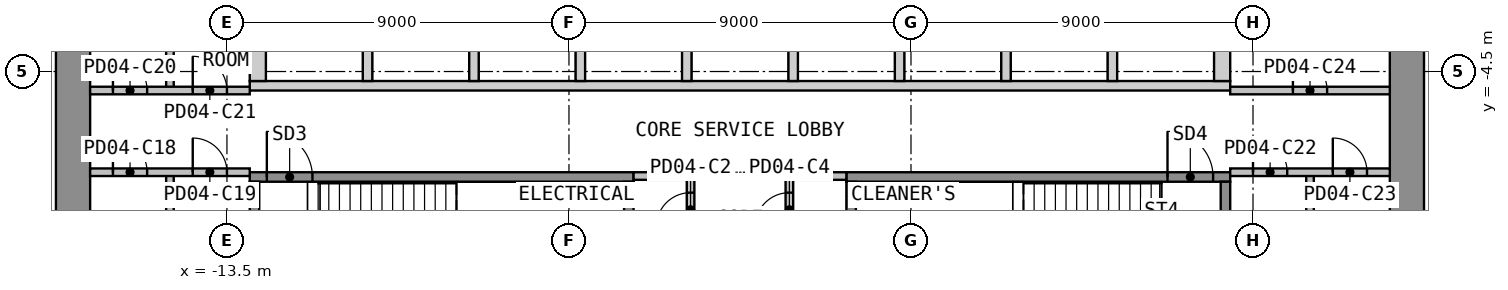
"""IFC4 building model, lengths in metres.
Left out: names, types, materials, properties, quantities, classifications, styles, units other than length and angle.
Written with IfcOpenShell. Run it as: python <this file> out.ifc"""

import sys

from ifc_helpers import new_model, si_unit, direction, frame, frame_2d, origin, place, context, subcontext, project, spatial, polyline, rectangle, outline, extrude, element, fill, save


model = new_model("IFC4")
c1 = context("Model", 3, precision=1e-05, world=origin(), true_north=direction((0.0, 1.0)))
c2 = subcontext(c1, "Body", "Model", "MODEL_VIEW")
j1 = project(units=[si_unit("LENGTHUNIT", "METRE"), si_unit("PLANEANGLEUNIT", "RADIAN")], contexts=[c1])
p1 = place(None, origin())
s1 = spatial("IfcSite", under=j1, at=p1, CompositionType="ELEMENT")
p2 = place(p1, origin())
s2 = spatial("IfcBuilding", under=s1, at=p2, CompositionType="ELEMENT")
p3 = place(p2, frame((0.0, 0.0, 20.4)))
s3 = spatial("IfcBuildingStorey", under=s2, at=p3, CompositionType="ELEMENT", Elevation=20.4)
p4 = place(p3, frame((-17.55, -12.6, 0.0), z_axis=(0.0, 0.0, 1.0), x_axis=(0.0, 1.0, 0.0)))
e1 = element("IfcWall", 1, at=p4, inside=s3, PredefinedType="SHEAR", context=c2, shape_type="SweptSolid", body=[
    extrude(rectangle(XDim=25.2, YDim=0.9, at=frame_2d((12.6, 0.0))), origin(), (0.0, 0.0, 1.0), 4.4),
])
p5 = place(p4, frame((11.4, 0.0, 0.0)))
e2 = element("IfcOpeningElement", 2, at=p5, cuts=e1, PredefinedType="OPENING", context=c2, shape_type="SweptSolid", body=[
    extrude(rectangle(XDim=2.4, YDim=2.1, at=frame_2d((1.2, 1.05))), frame((0.0, 0.46, 0.0), z_axis=(0.0, -1.0, 0.0), x_axis=(1.0, 0.0, 0.0)), (0.0, 0.0, 1.0), 0.92),
])
p6 = place(p3, frame((17.55, -12.6, 0.0), z_axis=(0.0, 0.0, 1.0), x_axis=(0.0, 1.0, 0.0)))
e3 = element("IfcWall", 3, at=p6, inside=s3, PredefinedType="SHEAR", context=c2, shape_type="SweptSolid", body=[
    extrude(rectangle(XDim=25.2, YDim=0.9, at=frame_2d((12.6, 0.0))), origin(), (0.0, 0.0, 1.0), 4.4),
])
p7 = place(p6, frame((11.4, 0.0, 0.0)))
e4 = element("IfcOpeningElement", 4, at=p7, cuts=e3, PredefinedType="OPENING", context=c2, shape_type="SweptSolid", body=[
    extrude(rectangle(XDim=2.4, YDim=2.1, at=frame_2d((1.2, 1.05))), frame((0.0, 0.46, 0.0), z_axis=(0.0, -1.0, 0.0), x_axis=(1.0, 0.0, 0.0)), (0.0, 0.0, 1.0), 0.92),
])
p8 = place(p3, origin())
e5 = element("IfcWall", 5, at=p8, inside=s3, PredefinedType="SHEAR", context=c2, shape_type="SweptSolid", body=[
    extrude(outline(polyline([(-12.9, -5.0), (12.9, -5.0), (12.9, -4.75), (-12.9, -4.75), (-12.9, -5.0)])), origin(), (0.0, 0.0, 1.0), 4.4),
])
p9 = place(p3, origin())
e6 = element("IfcWall", 6, at=p9, inside=s3, PredefinedType="SHEAR", context=c2, shape_type="SweptSolid", body=[
    extrude(outline(polyline([(-12.9, -4.75), (-12.475, -4.75), (-12.475, -2.05), (-12.9, -2.05), (-12.9, -4.75)])), origin(), (0.0, 0.0, 1.0), 4.4),
])
p10 = place(p3, origin())
e7 = element("IfcWall", 7, at=p10, inside=s3, PredefinedType="SHEAR", context=c2, shape_type="SweptSolid", body=[
    extrude(outline(polyline([(-9.925, -4.75), (-9.675, -4.75), (-9.675, -2.05), (-9.925, -2.05), (-9.925, -4.75)])), origin(), (0.0, 0.0, 1.0), 4.4),
])
p11 = place(p3, origin())
e8 = element("IfcWall", 8, at=p11, inside=s3, PredefinedType="SHEAR", context=c2, shape_type="SweptSolid", body=[
    extrude(outline(polyline([(-7.125, -4.75), (-6.875, -4.75), (-6.875, -2.05), (-7.125, -2.05), (-7.125, -4.75)])), origin(), (0.0, 0.0, 1.0), 4.4),
])
p12 = place(p3, origin())
e9 = element("IfcWall", 9, at=p12, inside=s3, PredefinedType="SHEAR", context=c2, shape_type="SweptSolid", body=[
    extrude(outline(polyline([(-4.325, -4.75), (-4.075, -4.75), (-4.075, -2.05), (-4.325, -2.05), (-4.325, -4.75)])), origin(), (0.0, 0.0, 1.0), 4.4),
])
p13 = place(p3, origin())
e10 = element("IfcWall", 10, at=p13, inside=s3, PredefinedType="SHEAR", context=c2, shape_type="SweptSolid", body=[
    extrude(outline(polyline([(-1.525, -4.75), (-1.275, -4.75), (-1.275, -2.05), (-1.525, -2.05), (-1.525, -4.75)])), origin(), (0.0, 0.0, 1.0), 4.4),
])
p14 = place(p3, origin())
e11 = element("IfcWall", 11, at=p14, inside=s3, PredefinedType="SHEAR", context=c2, shape_type="SweptSolid", body=[
    extrude(outline(polyline([(1.275, -4.75), (1.525, -4.75), (1.525, -2.05), (1.275, -2.05), (1.275, -4.75)])), origin(), (0.0, 0.0, 1.0), 4.4),
])
p15 = place(p3, origin())
e12 = element("IfcWall", 12, at=p15, inside=s3, PredefinedType="SHEAR", context=c2, shape_type="SweptSolid", body=[
    extrude(outline(polyline([(4.075, -4.75), (4.325, -4.75), (4.325, -2.05), (4.075, -2.05), (4.075, -4.75)])), origin(), (0.0, 0.0, 1.0), 4.4),
])
p16 = place(p3, origin())
e13 = element("IfcWall", 13, at=p16, inside=s3, PredefinedType="SHEAR", context=c2, shape_type="SweptSolid", body=[
    extrude(outline(polyline([(6.875, -4.75), (7.125, -4.75), (7.125, -2.05), (6.875, -2.05), (6.875, -4.75)])), origin(), (0.0, 0.0, 1.0), 4.4),
])
p17 = place(p3, origin())
e14 = element("IfcWall", 14, at=p17, inside=s3, PredefinedType="SHEAR", context=c2, shape_type="SweptSolid", body=[
    extrude(outline(polyline([(9.675, -4.75), (9.925, -4.75), (9.925, -2.05), (9.675, -2.05), (9.675, -4.75)])), origin(), (0.0, 0.0, 1.0), 4.4),
])
p18 = place(p3, origin())
e15 = element("IfcWall", 15, at=p18, inside=s3, PredefinedType="SHEAR", context=c2, shape_type="SweptSolid", body=[
    extrude(outline(polyline([(12.475, -4.75), (12.9, -4.75), (12.9, -2.05), (12.475, -2.05), (12.475, -4.75)])), origin(), (0.0, 0.0, 1.0), 4.4),
])
p19 = place(p3, frame((-12.9, -7.275, 0.0), z_axis=(0.0, 0.0, 1.0), x_axis=(1.0, 0.0, 0.0)))
e16 = element("IfcWall", 16, at=p19, inside=s3, PredefinedType="SHEAR", context=c2, shape_type="SweptSolid", body=[
    extrude(rectangle(XDim=10.1, YDim=0.25, at=frame_2d((5.05, 0.0))), origin(), (0.0, 0.0, 1.0), 4.4),
])
p20 = place(p19, frame((0.45, 0.0, 0.0)))
e17 = element("IfcOpeningElement", 17, at=p20, cuts=e16, PredefinedType="OPENING", context=c2, shape_type="SweptSolid", body=[
    extrude(rectangle(XDim=1.2, YDim=2.1, at=frame_2d((0.6, 1.05))), frame((0.0, 0.135, 0.0), z_axis=(0.0, -1.0, 0.0), x_axis=(1.0, 0.0, 0.0)), (0.0, 0.0, 1.0), 0.27),
])
for number, where, z_axis, x_axis in (
    (18, (-12.775, -10.65, 0.0), (0.0, 0.0, 1.0), (0.0, 1.0, 0.0)),
    (19, (-2.925, -10.65, 0.0), (0.0, 0.0, 1.0), (0.0, 1.0, 0.0)),
):
    element("IfcWall", number, at=place(p3, frame(where, z_axis=z_axis, x_axis=x_axis)), inside=s3, PredefinedType="SHEAR", context=c2, shape_type="SweptSolid", body=[
        extrude(rectangle(XDim=3.25, YDim=0.25, at=frame_2d((1.625, 0.0))), origin(), (0.0, 0.0, 1.0), 4.4),
    ])
p21 = place(p3, frame((2.8, -7.275, 0.0), z_axis=(0.0, 0.0, 1.0), x_axis=(1.0, 0.0, 0.0)))
e20 = element("IfcWall", 20, at=p21, inside=s3, PredefinedType="SHEAR", context=c2, shape_type="SweptSolid", body=[
    extrude(rectangle(XDim=10.1, YDim=0.25, at=frame_2d((5.05, 0.0))), origin(), (0.0, 0.0, 1.0), 4.4),
])
p22 = place(p21, frame((8.45, 0.0, 0.0)))
e21 = element("IfcOpeningElement", 21, at=p22, cuts=e20, PredefinedType="OPENING", context=c2, shape_type="SweptSolid", body=[
    extrude(rectangle(XDim=1.2, YDim=2.1, at=frame_2d((0.6, 1.05))), frame((0.0, 0.135, 0.0), z_axis=(0.0, -1.0, 0.0), x_axis=(1.0, 0.0, 0.0)), (0.0, 0.0, 1.0), 0.27),
])
for number, where, z_axis, x_axis in (
    (22, (2.925, -10.65, 0.0), (0.0, 0.0, 1.0), (0.0, 1.0, 0.0)),
    (23, (12.775, -10.65, 0.0), (0.0, 0.0, 1.0), (0.0, 1.0, 0.0)),
):
    element("IfcWall", number, at=place(p3, frame(where, z_axis=z_axis, x_axis=x_axis)), inside=s3, PredefinedType="SHEAR", context=c2, shape_type="SweptSolid", body=[
        extrude(rectangle(XDim=3.25, YDim=0.25, at=frame_2d((1.625, 0.0))), origin(), (0.0, 0.0, 1.0), 4.4),
    ])
for number, where, z_axis, x_axis in (
    (24, (-2.8, -7.25, 0.0), (0.0, 0.0, 1.0), (1.0, 0.0, 0.0)),
    (25, (1.4, -7.25, 0.0), (0.0, 0.0, 1.0), (1.0, 0.0, 0.0)),
):
    element("IfcWall", number, at=place(p3, frame(where, z_axis=z_axis, x_axis=x_axis)), inside=s3, PredefinedType="PARTITIONING", context=c2, shape_type="SweptSolid", body=[
        extrude(rectangle(XDim=1.4, YDim=0.2, at=frame_2d((0.7, 0.0))), origin(), (0.0, 0.0, 1.0), 4.4),
    ])
p23 = place(p3, frame((-1.3, -12.6, 0.0), z_axis=(0.0, 0.0, 1.0), x_axis=(0.0, 1.0, 0.0)))
e26 = element("IfcWall", 26, at=p23, inside=s3, PredefinedType="PARTITIONING", context=c2, shape_type="SweptSolid", body=[
    extrude(rectangle(XDim=5.45, YDim=0.2, at=frame_2d((2.725, 0.0))), origin(), (0.0, 0.0, 1.0), 4.4),
])
p24 = place(p23, frame((1.387, 0.0, 0.0)))
e27 = element("IfcOpeningElement", 27, at=p24, cuts=e26, PredefinedType="OPENING", context=c2, shape_type="SweptSolid", body=[
    extrude(rectangle(XDim=0.9, YDim=2.1, at=frame_2d((0.45, 1.05))), frame((0.0, 0.11, 0.0), z_axis=(0.0, -1.0, 0.0), x_axis=(1.0, 0.0, 0.0)), (0.0, 0.0, 1.0), 0.22),
])
p25 = place(p23, frame((4.012, 0.0, 0.0)))
e28 = element("IfcOpeningElement", 28, at=p25, cuts=e26, PredefinedType="OPENING", context=c2, shape_type="SweptSolid", body=[
    extrude(rectangle(XDim=0.9, YDim=2.1, at=frame_2d((0.45, 1.05))), frame((0.0, 0.11, 0.0), z_axis=(0.0, -1.0, 0.0), x_axis=(1.0, 0.0, 0.0)), (0.0, 0.0, 1.0), 0.22),
])
p26 = place(p3, frame((1.3, -12.6, 0.0), z_axis=(0.0, 0.0, 1.0), x_axis=(0.0, 1.0, 0.0)))
e29 = element("IfcWall", 29, at=p26, inside=s3, PredefinedType="PARTITIONING", context=c2, shape_type="SweptSolid", body=[
    extrude(rectangle(XDim=5.45, YDim=0.2, at=frame_2d((2.725, 0.0))), origin(), (0.0, 0.0, 1.0), 4.4),
])
p27 = place(p26, frame((1.387, 0.0, 0.0)))
e30 = element("IfcOpeningElement", 30, at=p27, cuts=e29, PredefinedType="OPENING", context=c2, shape_type="SweptSolid", body=[
    extrude(rectangle(XDim=0.9, YDim=2.1, at=frame_2d((0.45, 1.05))), frame((0.0, 0.11, 0.0), z_axis=(0.0, -1.0, 0.0), x_axis=(1.0, 0.0, 0.0)), (0.0, 0.0, 1.0), 0.22),
])
p28 = place(p26, frame((4.012, 0.0, 0.0)))
e31 = element("IfcOpeningElement", 31, at=p28, cuts=e29, PredefinedType="OPENING", context=c2, shape_type="SweptSolid", body=[
    extrude(rectangle(XDim=0.9, YDim=2.1, at=frame_2d((0.45, 1.05))), frame((0.0, 0.11, 0.0), z_axis=(0.0, -1.0, 0.0), x_axis=(1.0, 0.0, 0.0)), (0.0, 0.0, 1.0), 0.22),
])
p29 = place(p3, frame((-15.0, -12.6, 0.0), z_axis=(0.0, 0.0, 1.0), x_axis=(0.0, 1.0, 0.0)))
e32 = element("IfcWall", 32, at=p29, inside=s3, PredefinedType="PARTITIONING", context=c2, shape_type="SweptSolid", body=[
    extrude(rectangle(XDim=5.45, YDim=0.2, at=frame_2d((2.725, 0.0))), origin(), (0.0, 0.0, 1.0), 4.4),
])
p30 = place(p3, frame((-17.1, -7.15, 0.0), z_axis=(0.0, 0.0, 1.0), x_axis=(1.0, 0.0, 0.0)))
e33 = element("IfcWall", 33, at=p30, inside=s3, PredefinedType="PARTITIONING", context=c2, shape_type="SweptSolid", body=[
    extrude(rectangle(XDim=4.2, YDim=0.2, at=frame_2d((2.1, 0.0))), origin(), (0.0, 0.0, 1.0), 4.4),
])
p31 = place(p30, frame((0.6, 0.0, 0.0)))
e34 = element("IfcOpeningElement", 34, at=p31, cuts=e33, PredefinedType="OPENING", context=c2, shape_type="SweptSolid", body=[
    extrude(rectangle(XDim=0.9, YDim=2.1, at=frame_2d((0.45, 1.05))), frame((0.0, 0.11, 0.0), z_axis=(0.0, -1.0, 0.0), x_axis=(1.0, 0.0, 0.0)), (0.0, 0.0, 1.0), 0.22),
])
p32 = place(p30, frame((2.7, 0.0, 0.0)))
e35 = element("IfcOpeningElement", 35, at=p32, cuts=e33, PredefinedType="OPENING", context=c2, shape_type="SweptSolid", body=[
    extrude(rectangle(XDim=0.9, YDim=2.1, at=frame_2d((0.45, 1.05))), frame((0.0, 0.11, 0.0), z_axis=(0.0, -1.0, 0.0), x_axis=(1.0, 0.0, 0.0)), (0.0, 0.0, 1.0), 0.22),
])
p33 = place(p3, frame((-15.0, -5.0, 0.0), z_axis=(0.0, 0.0, 1.0), x_axis=(0.0, 1.0, 0.0)))
e36 = element("IfcWall", 36, at=p33, inside=s3, PredefinedType="PARTITIONING", context=c2, shape_type="SweptSolid", body=[
    extrude(rectangle(XDim=3.2, YDim=0.2, at=frame_2d((1.6, 0.0))), origin(), (0.0, 0.0, 1.0), 4.4),
])
p34 = place(p3, frame((-17.1, -5.0, 0.0), z_axis=(0.0, 0.0, 1.0), x_axis=(1.0, 0.0, 0.0)))
e37 = element("IfcWall", 37, at=p34, inside=s3, PredefinedType="PARTITIONING", context=c2, shape_type="SweptSolid", body=[
    extrude(rectangle(XDim=4.2, YDim=0.2, at=frame_2d((2.1, 0.0))), origin(), (0.0, 0.0, 1.0), 4.4),
])
p35 = place(p34, frame((0.6, 0.0, 0.0)))
e38 = element("IfcOpeningElement", 38, at=p35, cuts=e37, PredefinedType="OPENING", context=c2, shape_type="SweptSolid", body=[
    extrude(rectangle(XDim=0.9, YDim=2.1, at=frame_2d((0.45, 1.05))), frame((0.0, 0.11, 0.0), z_axis=(0.0, -1.0, 0.0), x_axis=(1.0, 0.0, 0.0)), (0.0, 0.0, 1.0), 0.22),
])
p36 = place(p34, frame((2.7, 0.0, 0.0)))
e39 = element("IfcOpeningElement", 39, at=p36, cuts=e37, PredefinedType="OPENING", context=c2, shape_type="SweptSolid", body=[
    extrude(rectangle(XDim=0.9, YDim=2.1, at=frame_2d((0.45, 1.05))), frame((0.0, 0.11, 0.0), z_axis=(0.0, -1.0, 0.0), x_axis=(1.0, 0.0, 0.0)), (0.0, 0.0, 1.0), 0.22),
])
p37 = place(p3, frame((15.0, -12.6, 0.0), z_axis=(0.0, 0.0, 1.0), x_axis=(0.0, 1.0, 0.0)))
e40 = element("IfcWall", 40, at=p37, inside=s3, PredefinedType="PARTITIONING", context=c2, shape_type="SweptSolid", body=[
    extrude(rectangle(XDim=5.45, YDim=0.2, at=frame_2d((2.725, 0.0))), origin(), (0.0, 0.0, 1.0), 4.4),
])
p38 = place(p3, frame((12.9, -7.15, 0.0), z_axis=(0.0, 0.0, 1.0), x_axis=(1.0, 0.0, 0.0)))
e41 = element("IfcWall", 41, at=p38, inside=s3, PredefinedType="PARTITIONING", context=c2, shape_type="SweptSolid", body=[
    extrude(rectangle(XDim=4.2, YDim=0.2, at=frame_2d((2.1, 0.0))), origin(), (0.0, 0.0, 1.0), 4.4),
])
p39 = place(p38, frame((0.6, 0.0, 0.0)))
e42 = element("IfcOpeningElement", 42, at=p39, cuts=e41, PredefinedType="OPENING", context=c2, shape_type="SweptSolid", body=[
    extrude(rectangle(XDim=0.9, YDim=2.1, at=frame_2d((0.45, 1.05))), frame((0.0, 0.11, 0.0), z_axis=(0.0, -1.0, 0.0), x_axis=(1.0, 0.0, 0.0)), (0.0, 0.0, 1.0), 0.22),
])
p40 = place(p38, frame((2.7, 0.0, 0.0)))
e43 = element("IfcOpeningElement", 43, at=p40, cuts=e41, PredefinedType="OPENING", context=c2, shape_type="SweptSolid", body=[
    extrude(rectangle(XDim=0.9, YDim=2.1, at=frame_2d((0.45, 1.05))), frame((0.0, 0.11, 0.0), z_axis=(0.0, -1.0, 0.0), x_axis=(1.0, 0.0, 0.0)), (0.0, 0.0, 1.0), 0.22),
])
p41 = place(p3, frame((12.9, -5.0, 0.0), z_axis=(0.0, 0.0, 1.0), x_axis=(1.0, 0.0, 0.0)))
e44 = element("IfcWall", 44, at=p41, inside=s3, PredefinedType="PARTITIONING", context=c2, shape_type="SweptSolid", body=[
    extrude(rectangle(XDim=4.2, YDim=0.2, at=frame_2d((2.1, 0.0))), origin(), (0.0, 0.0, 1.0), 4.4),
])
p42 = place(p41, frame((1.65, 0.0, 0.0)))
e45 = element("IfcOpeningElement", 45, at=p42, cuts=e44, PredefinedType="OPENING", context=c2, shape_type="SweptSolid", body=[
    extrude(rectangle(XDim=0.9, YDim=2.1, at=frame_2d((0.45, 1.05))), frame((0.0, 0.11, 0.0), z_axis=(0.0, -1.0, 0.0), x_axis=(1.0, 0.0, 0.0)), (0.0, 0.0, 1.0), 0.22),
])
p43 = place(p20, origin())
e46 = element("IfcDoor", 46, at=p43, inside=s3, OperationType="SINGLE_SWING_LEFT", PredefinedType="DOOR", context=c2, shape_type="SweptSolid", body=[
    extrude(rectangle(XDim=1.2, YDim=2.1, at=frame_2d((0.6, 1.05))), frame((0.0, 0.025, 0.0), z_axis=(0.0, -1.0, 0.0), x_axis=(1.0, 0.0, 0.0)), (0.0, 0.0, 1.0), 0.05),
])
fill(e17, e46)
p44 = place(p22, origin())
e47 = element("IfcDoor", 47, at=p44, inside=s3, OperationType="SINGLE_SWING_LEFT", PredefinedType="DOOR", context=c2, shape_type="SweptSolid", body=[
    extrude(rectangle(XDim=1.2, YDim=2.1, at=frame_2d((0.6, 1.05))), frame((0.0, 0.025, 0.0), z_axis=(0.0, -1.0, 0.0), x_axis=(1.0, 0.0, 0.0)), (0.0, 0.0, 1.0), 0.05),
])
fill(e21, e47)
p45 = place(p25, origin())
e48 = element("IfcDoor", 48, at=p45, inside=s3, OperationType="SINGLE_SWING_LEFT", PredefinedType="DOOR", context=c2, shape_type="SweptSolid", body=[
    extrude(rectangle(XDim=0.9, YDim=2.1, at=frame_2d((0.45, 1.05))), frame((0.0, 0.025, 0.0), z_axis=(0.0, -1.0, 0.0), x_axis=(1.0, 0.0, 0.0)), (0.0, 0.0, 1.0), 0.05),
])
fill(e28, e48)
p46 = place(p28, origin())
e49 = element("IfcDoor", 49, at=p46, inside=s3, OperationType="SINGLE_SWING_LEFT", PredefinedType="DOOR", context=c2, shape_type="SweptSolid", body=[
    extrude(rectangle(XDim=0.9, YDim=2.1, at=frame_2d((0.45, 1.05))), frame((0.0, 0.025, 0.0), z_axis=(0.0, -1.0, 0.0), x_axis=(1.0, 0.0, 0.0)), (0.0, 0.0, 1.0), 0.05),
])
fill(e31, e49)
p47 = place(p31, origin())
e50 = element("IfcDoor", 50, at=p47, inside=s3, OperationType="SINGLE_SWING_LEFT", PredefinedType="DOOR", context=c2, shape_type="SweptSolid", body=[
    extrude(rectangle(XDim=0.9, YDim=2.1, at=frame_2d((0.45, 1.05))), frame((0.0, 0.025, 0.0), z_axis=(0.0, -1.0, 0.0), x_axis=(1.0, 0.0, 0.0)), (0.0, 0.0, 1.0), 0.05),
])
fill(e34, e50)
p48 = place(p32, origin())
e51 = element("IfcDoor", 51, at=p48, inside=s3, OperationType="SINGLE_SWING_LEFT", PredefinedType="DOOR", context=c2, shape_type="SweptSolid", body=[
    extrude(rectangle(XDim=0.9, YDim=2.1, at=frame_2d((0.45, 1.05))), frame((0.0, 0.025, 0.0), z_axis=(0.0, -1.0, 0.0), x_axis=(1.0, 0.0, 0.0)), (0.0, 0.0, 1.0), 0.05),
])
fill(e35, e51)
p49 = place(p35, origin())
e52 = element("IfcDoor", 52, at=p49, inside=s3, OperationType="SINGLE_SWING_LEFT", PredefinedType="DOOR", context=c2, shape_type="SweptSolid", body=[
    extrude(rectangle(XDim=0.9, YDim=2.1, at=frame_2d((0.45, 1.05))), frame((0.0, 0.025, 0.0), z_axis=(0.0, -1.0, 0.0), x_axis=(1.0, 0.0, 0.0)), (0.0, 0.0, 1.0), 0.05),
])
fill(e38, e52)
p50 = place(p36, origin())
e53 = element("IfcDoor", 53, at=p50, inside=s3, OperationType="SINGLE_SWING_LEFT", PredefinedType="DOOR", context=c2, shape_type="SweptSolid", body=[
    extrude(rectangle(XDim=0.9, YDim=2.1, at=frame_2d((0.45, 1.05))), frame((0.0, 0.025, 0.0), z_axis=(0.0, -1.0, 0.0), x_axis=(1.0, 0.0, 0.0)), (0.0, 0.0, 1.0), 0.05),
])
fill(e39, e53)
p51 = place(p39, origin())
e54 = element("IfcDoor", 54, at=p51, inside=s3, OperationType="SINGLE_SWING_LEFT", PredefinedType="DOOR", context=c2, shape_type="SweptSolid", body=[
    extrude(rectangle(XDim=0.9, YDim=2.1, at=frame_2d((0.45, 1.05))), frame((0.0, 0.025, 0.0), z_axis=(0.0, -1.0, 0.0), x_axis=(1.0, 0.0, 0.0)), (0.0, 0.0, 1.0), 0.05),
])
fill(e42, e54)
p52 = place(p40, origin())
e55 = element("IfcDoor", 55, at=p52, inside=s3, OperationType="SINGLE_SWING_LEFT", PredefinedType="DOOR", context=c2, shape_type="SweptSolid", body=[
    extrude(rectangle(XDim=0.9, YDim=2.1, at=frame_2d((0.45, 1.05))), frame((0.0, 0.025, 0.0), z_axis=(0.0, -1.0, 0.0), x_axis=(1.0, 0.0, 0.0)), (0.0, 0.0, 1.0), 0.05),
])
fill(e43, e55)
p53 = place(p42, origin())
e56 = element("IfcDoor", 56, at=p53, inside=s3, OperationType="SINGLE_SWING_LEFT", PredefinedType="DOOR", context=c2, shape_type="SweptSolid", body=[
    extrude(rectangle(XDim=0.9, YDim=2.1, at=frame_2d((0.45, 1.05))), frame((0.0, 0.025, 0.0), z_axis=(0.0, -1.0, 0.0), x_axis=(1.0, 0.0, 0.0)), (0.0, 0.0, 1.0), 0.05),
])
fill(e45, e56)
save(model, sys.argv[1])
